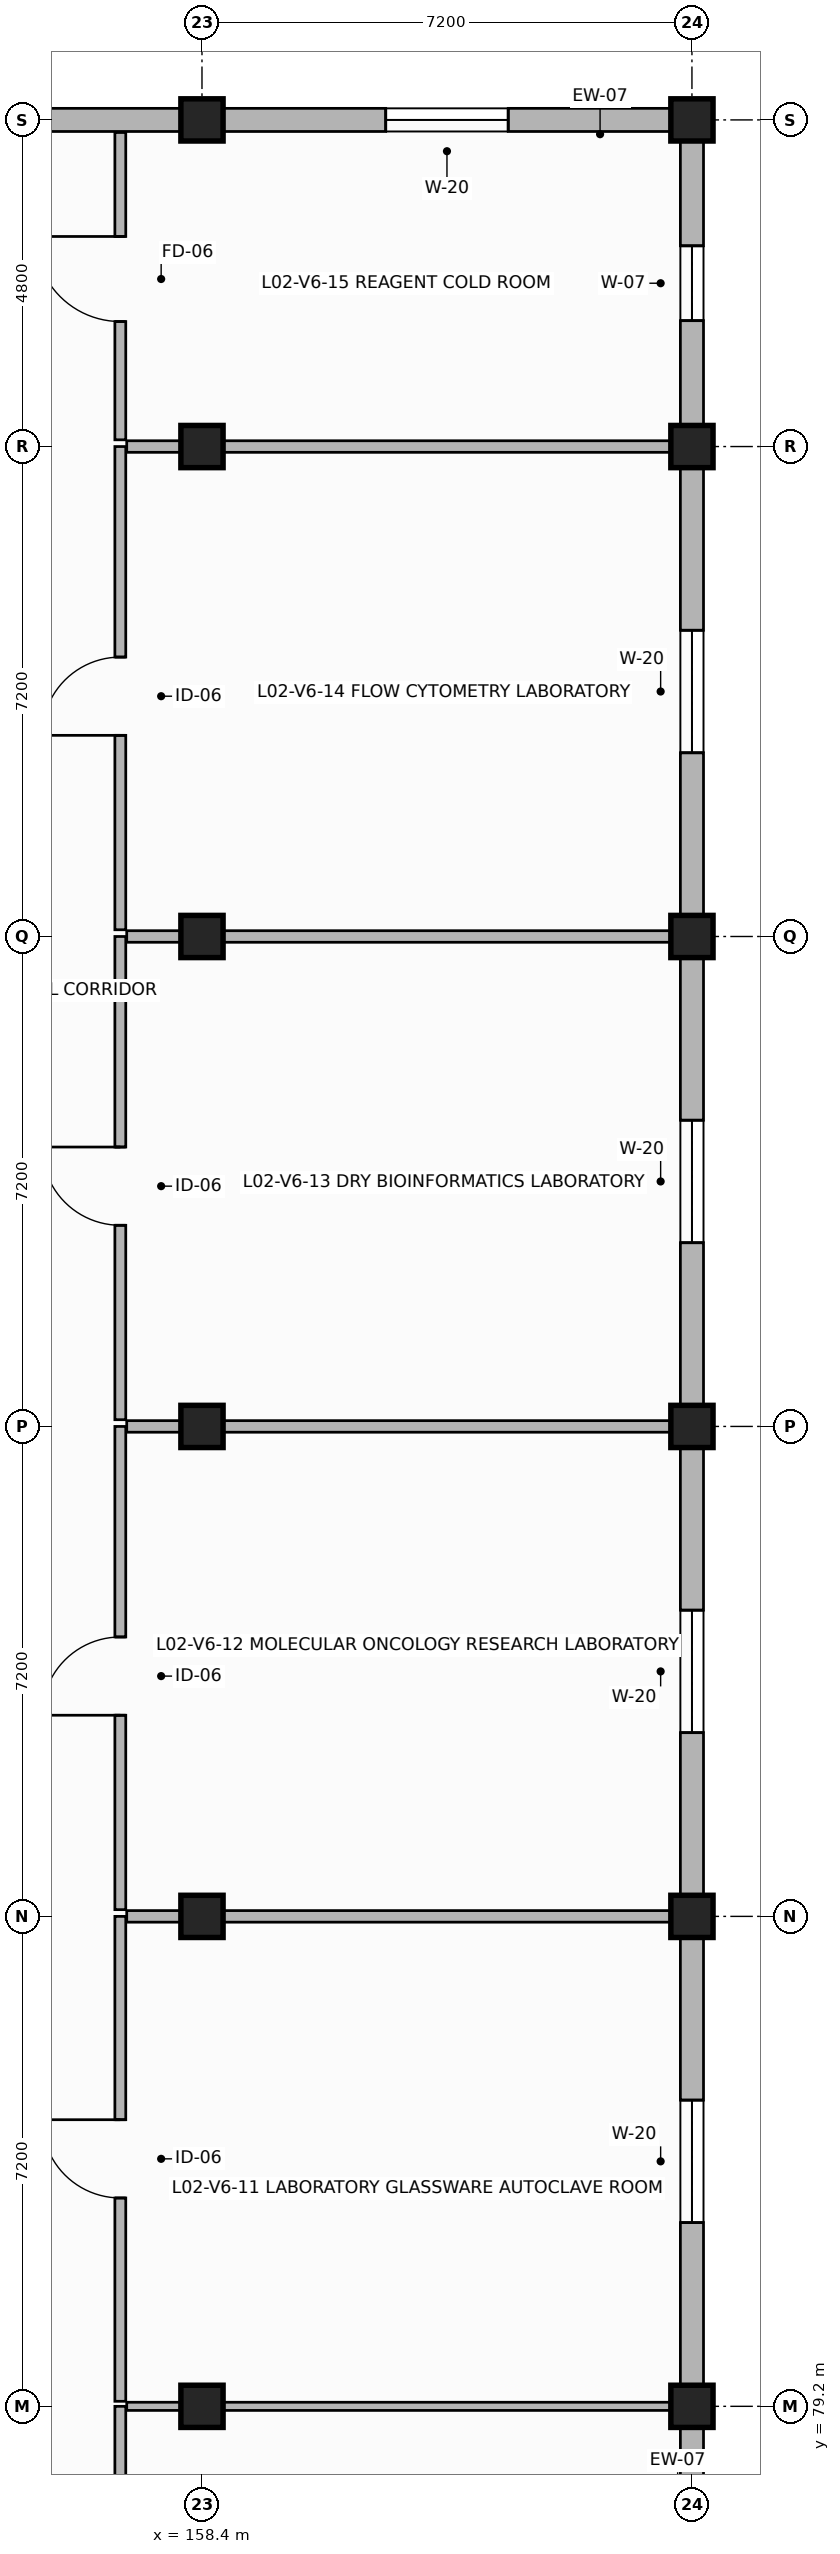
"""IFC4 building model, lengths in metres.
Left out: names, types, materials, properties, quantities, classifications, styles, units other than length and angle.
Written with IfcOpenShell. Run it as: python <this file> out.ifc"""

import sys

from ifc_helpers import new_model, si_unit, direction, frame, frame_2d, origin, origin_2d, place, context, subcontext, project, spatial, rectangle, extrude, element, fill, save


model = new_model("IFC4")
c1 = context("Model", 3, precision=1e-05, world=origin(), true_north=direction((0.0, 1.0)))
c2 = subcontext(c1, "Body", "Model", "MODEL_VIEW")
j1 = project(units=[si_unit("LENGTHUNIT", "METRE"), si_unit("PLANEANGLEUNIT", "RADIAN")], contexts=[c1])
p1 = place(None, origin())
s1 = spatial("IfcSite", under=j1, at=p1, CompositionType="ELEMENT")
p2 = place(p1, origin())
s2 = spatial("IfcBuilding", under=s1, at=p2, CompositionType="ELEMENT")
p3 = place(p2, frame((0.0, 0.0, 8.4)))
s3 = spatial("IfcBuildingStorey", under=s2, at=p3, CompositionType="ELEMENT", Elevation=8.4)
for number, where, z_axis, x_axis in (
    (1, (158.4, 79.2, 0.0), (0.0, 0.0, 1.0), (1.0, 0.0, 0.0)),
    (2, (158.4, 86.4, 0.0), (0.0, 0.0, 1.0), (1.0, 0.0, 0.0)),
    (3, (158.4, 93.6, 0.0), (0.0, 0.0, 1.0), (1.0, 0.0, 0.0)),
    (4, (158.4, 100.8, 0.0), (0.0, 0.0, 1.0), (1.0, 0.0, 0.0)),
    (5, (158.4, 108.0, 0.0), (0.0, 0.0, 1.0), (1.0, 0.0, 0.0)),
    (6, (158.4, 112.8, 0.0), (0.0, 0.0, 1.0), (1.0, 0.0, 0.0)),
    (7, (165.6, 79.2, 0.0), (0.0, 0.0, 1.0), (1.0, 0.0, 0.0)),
    (8, (165.6, 86.4, 0.0), (0.0, 0.0, 1.0), (1.0, 0.0, 0.0)),
    (9, (165.6, 93.6, 0.0), (0.0, 0.0, 1.0), (1.0, 0.0, 0.0)),
    (10, (165.6, 100.8, 0.0), (0.0, 0.0, 1.0), (1.0, 0.0, 0.0)),
    (11, (165.6, 108.0, 0.0), (0.0, 0.0, 1.0), (1.0, 0.0, 0.0)),
    (12, (165.6, 112.8, 0.0), (0.0, 0.0, 1.0), (1.0, 0.0, 0.0)),
):
    element("IfcColumn", number, at=place(p3, frame(where, z_axis=z_axis, x_axis=x_axis)), inside=s3, PredefinedType="COLUMN", context=c2, shape_type="SweptSolid", body=[
        extrude(rectangle(XDim=0.62, YDim=0.62, at=origin_2d()), origin(), (0.0, 0.0, 1.0), 3.58),
    ])
p4 = place(p3, frame((165.6, 72.0, 0.0), z_axis=(0.0, 0.0, 1.0), x_axis=(0.0, 1.0, 0.0)))
e13 = element("IfcWall", 13, at=p4, inside=s3, PredefinedType="SOLIDWALL", context=c2, shape_type="SweptSolid", body=[
    extrude(rectangle(XDim=7.2, YDim=0.34, at=frame_2d((3.6, 0.0))), origin(), (0.0, 0.0, 1.0), 2.91),
])
p5 = place(p4, frame((2.7, 0.0, 0.85)))
e14 = element("IfcOpeningElement", 14, at=p5, cuts=e13, PredefinedType="OPENING", context=c2, shape_type="SweptSolid", body=[
    extrude(rectangle(XDim=1.8, YDim=1.85, at=frame_2d((0.9, 0.925))), frame((0.0, 0.18, 0.0), z_axis=(0.0, -1.0, 0.0), x_axis=(1.0, 0.0, 0.0)), (0.0, 0.0, 1.0), 0.36),
])
p6 = place(p3, frame((165.6, 79.2, 0.0), z_axis=(0.0, 0.0, 1.0), x_axis=(0.0, 1.0, 0.0)))
e15 = element("IfcWall", 15, at=p6, inside=s3, PredefinedType="SOLIDWALL", context=c2, shape_type="SweptSolid", body=[
    extrude(rectangle(XDim=7.2, YDim=0.34, at=frame_2d((3.6, 0.0))), origin(), (0.0, 0.0, 1.0), 2.91),
])
p7 = place(p6, frame((2.7, 0.0, 0.85)))
e16 = element("IfcOpeningElement", 16, at=p7, cuts=e15, PredefinedType="OPENING", context=c2, shape_type="SweptSolid", body=[
    extrude(rectangle(XDim=1.8, YDim=1.85, at=frame_2d((0.9, 0.925))), frame((0.0, 0.18, 0.0), z_axis=(0.0, -1.0, 0.0), x_axis=(1.0, 0.0, 0.0)), (0.0, 0.0, 1.0), 0.36),
])
p8 = place(p3, frame((165.6, 86.4, 0.0), z_axis=(0.0, 0.0, 1.0), x_axis=(0.0, 1.0, 0.0)))
e17 = element("IfcWall", 17, at=p8, inside=s3, PredefinedType="SOLIDWALL", context=c2, shape_type="SweptSolid", body=[
    extrude(rectangle(XDim=7.2, YDim=0.34, at=frame_2d((3.6, 0.0))), origin(), (0.0, 0.0, 1.0), 2.91),
])
p9 = place(p8, frame((2.7, 0.0, 0.85)))
e18 = element("IfcOpeningElement", 18, at=p9, cuts=e17, PredefinedType="OPENING", context=c2, shape_type="SweptSolid", body=[
    extrude(rectangle(XDim=1.8, YDim=1.85, at=frame_2d((0.9, 0.925))), frame((0.0, 0.18, 0.0), z_axis=(0.0, -1.0, 0.0), x_axis=(1.0, 0.0, 0.0)), (0.0, 0.0, 1.0), 0.36),
])
p10 = place(p3, frame((165.6, 93.6, 0.0), z_axis=(0.0, 0.0, 1.0), x_axis=(0.0, 1.0, 0.0)))
e19 = element("IfcWall", 19, at=p10, inside=s3, PredefinedType="SOLIDWALL", context=c2, shape_type="SweptSolid", body=[
    extrude(rectangle(XDim=7.2, YDim=0.34, at=frame_2d((3.6, 0.0))), origin(), (0.0, 0.0, 1.0), 2.91),
])
p11 = place(p10, frame((2.7, 0.0, 0.85)))
e20 = element("IfcOpeningElement", 20, at=p11, cuts=e19, PredefinedType="OPENING", context=c2, shape_type="SweptSolid", body=[
    extrude(rectangle(XDim=1.8, YDim=1.85, at=frame_2d((0.9, 0.925))), frame((0.0, 0.18, 0.0), z_axis=(0.0, -1.0, 0.0), x_axis=(1.0, 0.0, 0.0)), (0.0, 0.0, 1.0), 0.36),
])
p12 = place(p3, frame((165.6, 100.8, 0.0), z_axis=(0.0, 0.0, 1.0), x_axis=(0.0, 1.0, 0.0)))
e21 = element("IfcWall", 21, at=p12, inside=s3, PredefinedType="SOLIDWALL", context=c2, shape_type="SweptSolid", body=[
    extrude(rectangle(XDim=7.2, YDim=0.34, at=frame_2d((3.6, 0.0))), origin(), (0.0, 0.0, 1.0), 2.91),
])
p13 = place(p12, frame((2.7, 0.0, 0.85)))
e22 = element("IfcOpeningElement", 22, at=p13, cuts=e21, PredefinedType="OPENING", context=c2, shape_type="SweptSolid", body=[
    extrude(rectangle(XDim=1.8, YDim=1.85, at=frame_2d((0.9, 0.925))), frame((0.0, 0.18, 0.0), z_axis=(0.0, -1.0, 0.0), x_axis=(1.0, 0.0, 0.0)), (0.0, 0.0, 1.0), 0.36),
])
p14 = place(p3, frame((165.6, 108.0, 0.0), z_axis=(0.0, 0.0, 1.0), x_axis=(0.0, 1.0, 0.0)))
e23 = element("IfcWall", 23, at=p14, inside=s3, PredefinedType="SOLIDWALL", context=c2, shape_type="SweptSolid", body=[
    extrude(rectangle(XDim=4.8, YDim=0.34, at=frame_2d((2.4, 0.0))), origin(), (0.0, 0.0, 1.0), 2.91),
])
p15 = place(p14, frame((1.85, 0.0, 0.85)))
e24 = element("IfcOpeningElement", 24, at=p15, cuts=e23, PredefinedType="OPENING", context=c2, shape_type="SweptSolid", body=[
    extrude(rectangle(XDim=1.1, YDim=1.85, at=frame_2d((0.55, 0.925))), frame((0.0, 0.18, 0.0), z_axis=(0.0, -1.0, 0.0), x_axis=(1.0, 0.0, 0.0)), (0.0, 0.0, 1.0), 0.36),
])
p16 = place(p3, frame((165.6, 112.8, 0.0), z_axis=(0.0, 0.0, 1.0), x_axis=(-1.0, 0.0, 0.0)))
e25 = element("IfcWall", 25, at=p16, inside=s3, PredefinedType="SOLIDWALL", context=c2, shape_type="SweptSolid", body=[
    extrude(rectangle(XDim=7.2, YDim=0.34, at=frame_2d((3.6, 0.0))), origin(), (0.0, 0.0, 1.0), 2.91),
])
p17 = place(p16, frame((2.7, 0.0, 0.85)))
e26 = element("IfcOpeningElement", 26, at=p17, cuts=e25, PredefinedType="OPENING", context=c2, shape_type="SweptSolid", body=[
    extrude(rectangle(XDim=1.8, YDim=1.85, at=frame_2d((0.9, 0.925))), frame((0.0, 0.18, 0.0), z_axis=(0.0, -1.0, 0.0), x_axis=(1.0, 0.0, 0.0)), (0.0, 0.0, 1.0), 0.36),
])
p18 = place(p3, frame((158.4, 112.8, 0.0), z_axis=(0.0, 0.0, 1.0), x_axis=(-1.0, 0.0, 0.0)))
e27 = element("IfcWall", 27, at=p18, inside=s3, PredefinedType="SOLIDWALL", context=c2, shape_type="SweptSolid", body=[
    extrude(rectangle(XDim=7.2, YDim=0.34, at=frame_2d((3.6, 0.0))), origin(), (0.0, 0.0, 1.0), 2.91),
])
p19 = place(p18, frame((4.7, 0.0, 0.85)))
e28 = element("IfcOpeningElement", 28, at=p19, cuts=e27, PredefinedType="OPENING", context=c2, shape_type="SweptSolid", body=[
    extrude(rectangle(XDim=1.8, YDim=1.85, at=frame_2d((0.9, 0.925))), frame((0.0, 0.18, 0.0), z_axis=(0.0, -1.0, 0.0), x_axis=(1.0, 0.0, 0.0)), (0.0, 0.0, 1.0), 0.36),
])
p20 = place(p3, frame((157.2, 72.109, 0.0), z_axis=(0.0, 0.0, 1.0), x_axis=(0.0, 1.0, 0.0)))
e29 = element("IfcWall", 29, at=p20, inside=s3, PredefinedType="PARTITIONING", context=c2, shape_type="SweptSolid", body=[
    extrude(rectangle(XDim=7.091, YDim=0.16, at=frame_2d((3.545, 0.0))), origin(), (0.0, 0.0, 1.0), 2.89),
])
p21 = place(p20, frame((3.036, 0.0, 0.0)))
e30 = element("IfcOpeningElement", 30, at=p21, cuts=e29, PredefinedType="OPENING", context=c2, shape_type="SweptSolid", body=[
    extrude(rectangle(XDim=1.02, YDim=2.15, at=frame_2d((0.51, 1.075))), frame((0.0, 0.09, 0.0), z_axis=(0.0, -1.0, 0.0), x_axis=(1.0, 0.0, 0.0)), (0.0, 0.0, 1.0), 0.18),
])
p22 = place(p3, frame((157.294, 79.2, 0.0), z_axis=(0.0, 0.0, 1.0), x_axis=(1.0, 0.0, 0.0)))
e31 = element("IfcWall", 31, at=p22, inside=s3, PredefinedType="PARTITIONING", context=c2, shape_type="SweptSolid", body=[
    extrude(rectangle(XDim=8.121, YDim=0.12, at=frame_2d((4.061, 0.0))), origin(), (0.0, 0.0, 1.0), 2.89),
])
p23 = place(p3, frame((157.2, 79.274, 0.0), z_axis=(0.0, 0.0, 1.0), x_axis=(0.0, 1.0, 0.0)))
e32 = element("IfcWall", 32, at=p23, inside=s3, PredefinedType="PARTITIONING", context=c2, shape_type="SweptSolid", body=[
    extrude(rectangle(XDim=7.126, YDim=0.16, at=frame_2d((3.563, 0.0))), origin(), (0.0, 0.0, 1.0), 2.89),
])
p24 = place(p23, frame((2.988, 0.0, 0.0)))
e33 = element("IfcOpeningElement", 33, at=p24, cuts=e32, PredefinedType="OPENING", context=c2, shape_type="SweptSolid", body=[
    extrude(rectangle(XDim=1.15, YDim=2.25, at=frame_2d((0.575, 1.125))), frame((0.0, 0.09, 0.0), z_axis=(0.0, -1.0, 0.0), x_axis=(1.0, 0.0, 0.0)), (0.0, 0.0, 1.0), 0.18),
])
p25 = place(p3, frame((157.294, 86.4, 0.0), z_axis=(0.0, 0.0, 1.0), x_axis=(1.0, 0.0, 0.0)))
e34 = element("IfcWall", 34, at=p25, inside=s3, PredefinedType="PARTITIONING", context=c2, shape_type="SweptSolid", body=[
    extrude(rectangle(XDim=8.121, YDim=0.17, at=frame_2d((4.061, 0.0))), origin(), (0.0, 0.0, 1.0), 2.89),
])
p26 = place(p3, frame((157.2, 86.499, 0.0), z_axis=(0.0, 0.0, 1.0), x_axis=(0.0, 1.0, 0.0)))
e35 = element("IfcWall", 35, at=p26, inside=s3, PredefinedType="PARTITIONING", context=c2, shape_type="SweptSolid", body=[
    extrude(rectangle(XDim=7.101, YDim=0.16, at=frame_2d((3.551, 0.0))), origin(), (0.0, 0.0, 1.0), 2.89),
])
p27 = place(p26, frame((2.857, 0.0, 0.0)))
e36 = element("IfcOpeningElement", 36, at=p27, cuts=e35, PredefinedType="OPENING", context=c2, shape_type="SweptSolid", body=[
    extrude(rectangle(XDim=1.15, YDim=2.25, at=frame_2d((0.575, 1.125))), frame((0.0, 0.09, 0.0), z_axis=(0.0, -1.0, 0.0), x_axis=(1.0, 0.0, 0.0)), (0.0, 0.0, 1.0), 0.18),
])
p28 = place(p3, frame((157.294, 93.6, 0.0), z_axis=(0.0, 0.0, 1.0), x_axis=(1.0, 0.0, 0.0)))
e37 = element("IfcWall", 37, at=p28, inside=s3, PredefinedType="PARTITIONING", context=c2, shape_type="SweptSolid", body=[
    extrude(rectangle(XDim=8.121, YDim=0.17, at=frame_2d((4.061, 0.0))), origin(), (0.0, 0.0, 1.0), 2.89),
])
p29 = place(p3, frame((157.2, 93.699, 0.0), z_axis=(0.0, 0.0, 1.0), x_axis=(0.0, 1.0, 0.0)))
e38 = element("IfcWall", 38, at=p29, inside=s3, PredefinedType="PARTITIONING", context=c2, shape_type="SweptSolid", body=[
    extrude(rectangle(XDim=7.101, YDim=0.16, at=frame_2d((3.551, 0.0))), origin(), (0.0, 0.0, 1.0), 2.89),
])
p30 = place(p29, frame((2.857, 0.0, 0.0)))
e39 = element("IfcOpeningElement", 39, at=p30, cuts=e38, PredefinedType="OPENING", context=c2, shape_type="SweptSolid", body=[
    extrude(rectangle(XDim=1.15, YDim=2.25, at=frame_2d((0.575, 1.125))), frame((0.0, 0.09, 0.0), z_axis=(0.0, -1.0, 0.0), x_axis=(1.0, 0.0, 0.0)), (0.0, 0.0, 1.0), 0.18),
])
p31 = place(p3, frame((157.294, 100.8, 0.0), z_axis=(0.0, 0.0, 1.0), x_axis=(1.0, 0.0, 0.0)))
e40 = element("IfcWall", 40, at=p31, inside=s3, PredefinedType="PARTITIONING", context=c2, shape_type="SweptSolid", body=[
    extrude(rectangle(XDim=8.121, YDim=0.17, at=frame_2d((4.061, 0.0))), origin(), (0.0, 0.0, 1.0), 2.89),
])
p32 = place(p3, frame((157.2, 100.899, 0.0), z_axis=(0.0, 0.0, 1.0), x_axis=(0.0, 1.0, 0.0)))
e41 = element("IfcWall", 41, at=p32, inside=s3, PredefinedType="PARTITIONING", context=c2, shape_type="SweptSolid", body=[
    extrude(rectangle(XDim=7.101, YDim=0.16, at=frame_2d((3.551, 0.0))), origin(), (0.0, 0.0, 1.0), 2.89),
])
p33 = place(p32, frame((2.857, 0.0, 0.0)))
e42 = element("IfcOpeningElement", 42, at=p33, cuts=e41, PredefinedType="OPENING", context=c2, shape_type="SweptSolid", body=[
    extrude(rectangle(XDim=1.15, YDim=2.25, at=frame_2d((0.575, 1.125))), frame((0.0, 0.09, 0.0), z_axis=(0.0, -1.0, 0.0), x_axis=(1.0, 0.0, 0.0)), (0.0, 0.0, 1.0), 0.18),
])
p34 = place(p3, frame((157.294, 108.0, 0.0), z_axis=(0.0, 0.0, 1.0), x_axis=(1.0, 0.0, 0.0)))
e43 = element("IfcWall", 43, at=p34, inside=s3, PredefinedType="PARTITIONING", context=c2, shape_type="SweptSolid", body=[
    extrude(rectangle(XDim=8.121, YDim=0.17, at=frame_2d((4.061, 0.0))), origin(), (0.0, 0.0, 1.0), 2.89),
])
p35 = place(p3, frame((157.2, 108.099, 0.0), z_axis=(0.0, 0.0, 1.0), x_axis=(0.0, 1.0, 0.0)))
e44 = element("IfcWall", 44, at=p35, inside=s3, PredefinedType="PARTITIONING", context=c2, shape_type="SweptSolid", body=[
    extrude(rectangle(XDim=4.516, YDim=0.16, at=frame_2d((2.258, 0.0))), origin(), (0.0, 0.0, 1.0), 2.89),
])
p36 = place(p35, frame((1.738, 0.0, 0.0)))
e45 = element("IfcOpeningElement", 45, at=p36, cuts=e44, PredefinedType="OPENING", context=c2, shape_type="SweptSolid", body=[
    extrude(rectangle(XDim=1.25, YDim=2.2, at=frame_2d((0.625, 1.1))), frame((0.0, 0.09, 0.0), z_axis=(0.0, -1.0, 0.0), x_axis=(1.0, 0.0, 0.0)), (0.0, 0.0, 1.0), 0.18),
])
p37 = place(p7, origin())
e46 = element("IfcWindow", 46, at=p37, inside=s3, PartitioningType="SINGLE_PANEL", PredefinedType="WINDOW", context=c2, shape_type="SweptSolid", body=[
    extrude(rectangle(XDim=1.8, YDim=1.85, at=frame_2d((0.9, 0.925))), frame((0.0, 0.03, 0.0), z_axis=(0.0, -1.0, 0.0), x_axis=(1.0, 0.0, 0.0)), (0.0, 0.0, 1.0), 0.06),
])
fill(e16, e46)
p38 = place(p9, origin())
e47 = element("IfcWindow", 47, at=p38, inside=s3, PartitioningType="SINGLE_PANEL", PredefinedType="WINDOW", context=c2, shape_type="SweptSolid", body=[
    extrude(rectangle(XDim=1.8, YDim=1.85, at=frame_2d((0.9, 0.925))), frame((0.0, 0.03, 0.0), z_axis=(0.0, -1.0, 0.0), x_axis=(1.0, 0.0, 0.0)), (0.0, 0.0, 1.0), 0.06),
])
fill(e18, e47)
p39 = place(p11, origin())
e48 = element("IfcWindow", 48, at=p39, inside=s3, PartitioningType="SINGLE_PANEL", PredefinedType="WINDOW", context=c2, shape_type="SweptSolid", body=[
    extrude(rectangle(XDim=1.8, YDim=1.85, at=frame_2d((0.9, 0.925))), frame((0.0, 0.03, 0.0), z_axis=(0.0, -1.0, 0.0), x_axis=(1.0, 0.0, 0.0)), (0.0, 0.0, 1.0), 0.06),
])
fill(e20, e48)
p40 = place(p13, origin())
e49 = element("IfcWindow", 49, at=p40, inside=s3, PartitioningType="SINGLE_PANEL", PredefinedType="WINDOW", context=c2, shape_type="SweptSolid", body=[
    extrude(rectangle(XDim=1.8, YDim=1.85, at=frame_2d((0.9, 0.925))), frame((0.0, 0.03, 0.0), z_axis=(0.0, -1.0, 0.0), x_axis=(1.0, 0.0, 0.0)), (0.0, 0.0, 1.0), 0.06),
])
fill(e22, e49)
p41 = place(p15, origin())
e50 = element("IfcWindow", 50, at=p41, inside=s3, PartitioningType="SINGLE_PANEL", PredefinedType="WINDOW", context=c2, shape_type="SweptSolid", body=[
    extrude(rectangle(XDim=1.1, YDim=1.85, at=frame_2d((0.55, 0.925))), frame((0.0, 0.03, 0.0), z_axis=(0.0, -1.0, 0.0), x_axis=(1.0, 0.0, 0.0)), (0.0, 0.0, 1.0), 0.06),
])
fill(e24, e50)
p42 = place(p17, origin())
e51 = element("IfcWindow", 51, at=p42, inside=s3, PartitioningType="SINGLE_PANEL", PredefinedType="WINDOW", context=c2, shape_type="SweptSolid", body=[
    extrude(rectangle(XDim=1.8, YDim=1.85, at=frame_2d((0.9, 0.925))), frame((0.0, 0.03, 0.0), z_axis=(0.0, -1.0, 0.0), x_axis=(1.0, 0.0, 0.0)), (0.0, 0.0, 1.0), 0.06),
])
fill(e26, e51)
p43 = place(p24, origin())
e52 = element("IfcDoor", 52, at=p43, inside=s3, OperationType="SINGLE_SWING_RIGHT", PredefinedType="DOOR", context=c2, shape_type="SweptSolid", body=[
    extrude(rectangle(XDim=1.15, YDim=2.25, at=frame_2d((0.575, 1.125))), frame((0.0, 0.025, 0.0), z_axis=(0.0, -1.0, 0.0), x_axis=(1.0, 0.0, 0.0)), (0.0, 0.0, 1.0), 0.05),
])
fill(e33, e52)
p44 = place(p27, origin())
e53 = element("IfcDoor", 53, at=p44, inside=s3, OperationType="SINGLE_SWING_LEFT", PredefinedType="DOOR", context=c2, shape_type="SweptSolid", body=[
    extrude(rectangle(XDim=1.15, YDim=2.25, at=frame_2d((0.575, 1.125))), frame((0.0, 0.025, 0.0), z_axis=(0.0, -1.0, 0.0), x_axis=(1.0, 0.0, 0.0)), (0.0, 0.0, 1.0), 0.05),
])
fill(e36, e53)
p45 = place(p30, origin())
e54 = element("IfcDoor", 54, at=p45, inside=s3, OperationType="SINGLE_SWING_RIGHT", PredefinedType="DOOR", context=c2, shape_type="SweptSolid", body=[
    extrude(rectangle(XDim=1.15, YDim=2.25, at=frame_2d((0.575, 1.125))), frame((0.0, 0.025, 0.0), z_axis=(0.0, -1.0, 0.0), x_axis=(1.0, 0.0, 0.0)), (0.0, 0.0, 1.0), 0.05),
])
fill(e39, e54)
p46 = place(p33, origin())
e55 = element("IfcDoor", 55, at=p46, inside=s3, OperationType="SINGLE_SWING_LEFT", PredefinedType="DOOR", context=c2, shape_type="SweptSolid", body=[
    extrude(rectangle(XDim=1.15, YDim=2.25, at=frame_2d((0.575, 1.125))), frame((0.0, 0.025, 0.0), z_axis=(0.0, -1.0, 0.0), x_axis=(1.0, 0.0, 0.0)), (0.0, 0.0, 1.0), 0.05),
])
fill(e42, e55)
p47 = place(p36, origin())
e56 = element("IfcDoor", 56, at=p47, inside=s3, OperationType="SINGLE_SWING_RIGHT", PredefinedType="DOOR", context=c2, shape_type="SweptSolid", body=[
    extrude(rectangle(XDim=1.25, YDim=2.2, at=frame_2d((0.625, 1.1))), frame((0.0, 0.025, 0.0), z_axis=(0.0, -1.0, 0.0), x_axis=(1.0, 0.0, 0.0)), (0.0, 0.0, 1.0), 0.05),
])
fill(e45, e56)
save(model, sys.argv[1])
